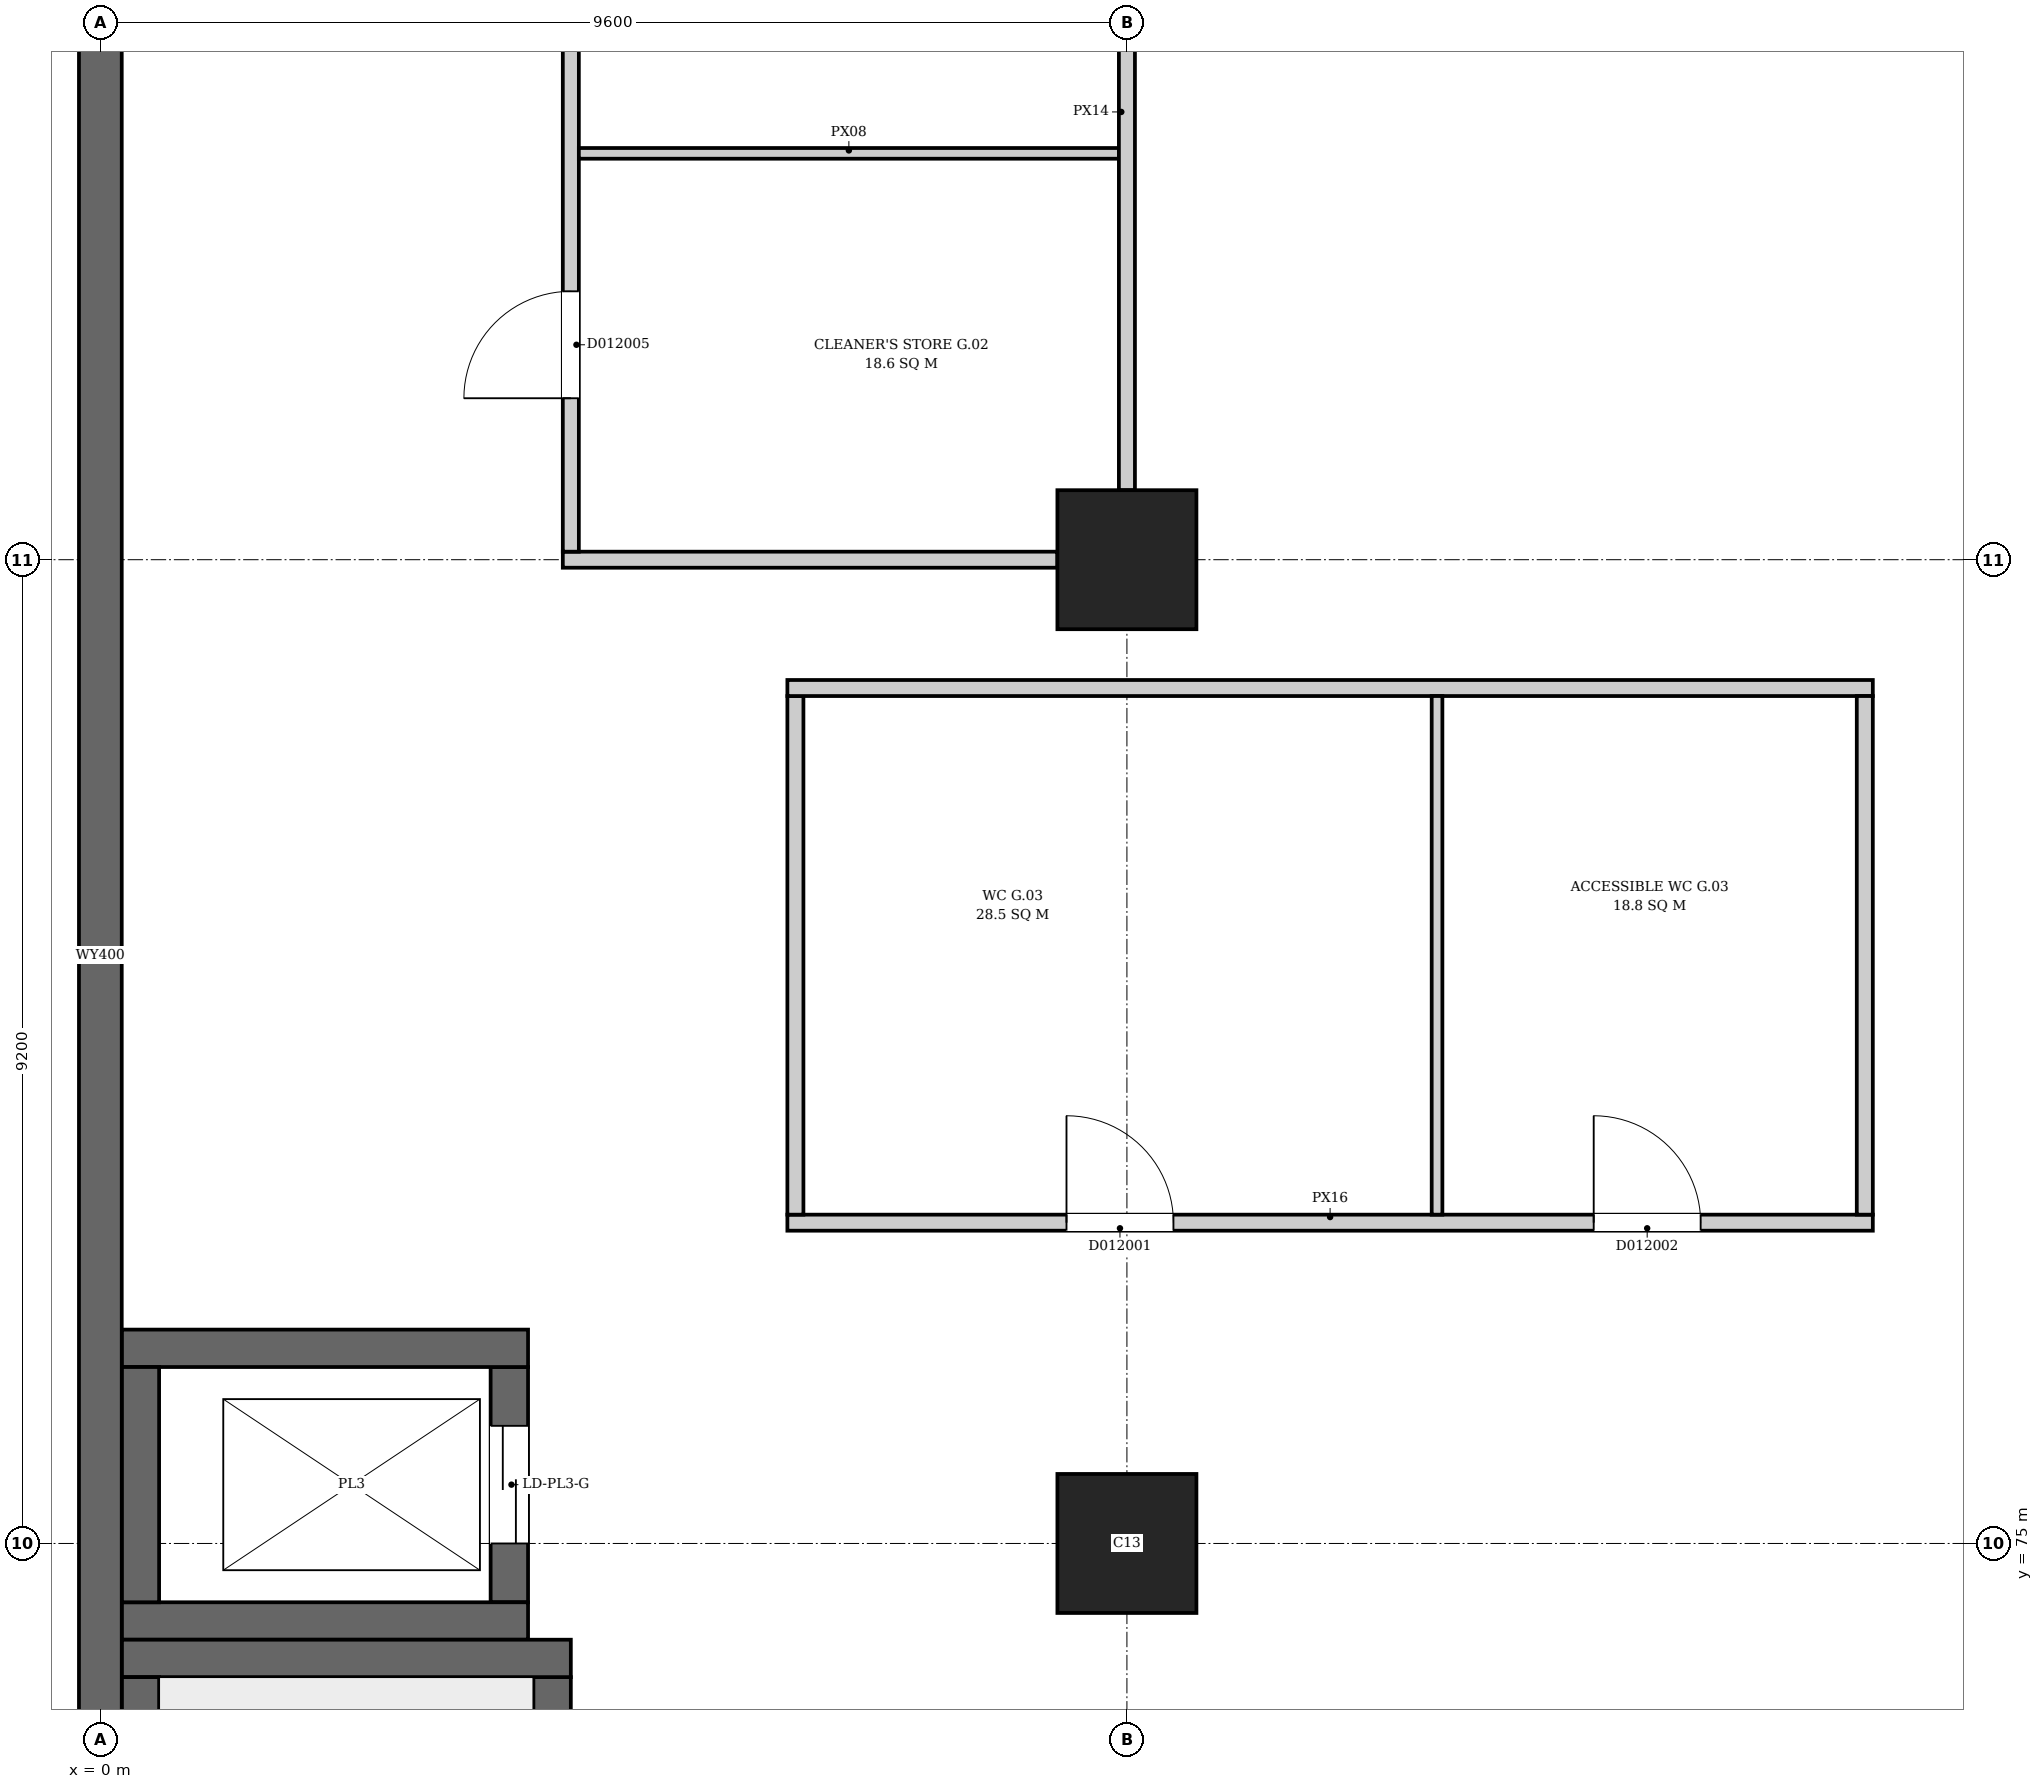
"""IFC4 building model, lengths in metres.
Left out: names, types, materials, properties, quantities, classifications, styles, units other than length and angle.
Written with IfcOpenShell. Run it as: python <this file> out.ifc"""

import sys

from ifc_helpers import new_model, si_unit, direction, frame, frame_2d, origin, origin_2d, place, context, subcontext, project, spatial, rectangle, extrude, element, fill, save


model = new_model("IFC4")
c1 = context("Model", 3, precision=1e-05, world=origin(), true_north=direction((0.0, 1.0)))
c2 = subcontext(c1, "Body", "Model", "MODEL_VIEW")
j1 = project(units=[si_unit("LENGTHUNIT", "METRE"), si_unit("PLANEANGLEUNIT", "RADIAN")], contexts=[c1])
p1 = place(None, origin())
s1 = spatial("IfcSite", under=j1, at=p1, CompositionType="ELEMENT")
p2 = place(p1, origin())
s2 = spatial("IfcBuilding", under=s1, at=p2, CompositionType="ELEMENT")
p3 = place(p2, origin())
s3 = spatial("IfcBuildingStorey", under=s2, at=p3, CompositionType="ELEMENT", Elevation=0.0)
p4 = place(p3, frame((0.0, 46.72, 0.0), z_axis=(0.0, 0.0, 1.0), x_axis=(0.0, 1.0, 0.0)))
e1 = element("IfcWall", 1, at=p4, inside=s3, PredefinedType="SHEAR", context=c2, shape_type="SweptSolid", body=[
    extrude(rectangle(XDim=47.36, YDim=0.4, at=frame_2d((23.68, 0.0))), origin(), (0.0, 0.0, 1.0), 6.5),
])
p5 = place(p4, frame((16.63, 0.0, 0.0)))
e2 = element("IfcOpeningElement", 2, at=p5, cuts=e1, PredefinedType="OPENING", context=c2, shape_type="SweptSolid", body=[
    extrude(rectangle(XDim=3.0, YDim=2.4, at=frame_2d((1.5, 1.2))), frame((0.0, 0.21, 0.0), z_axis=(0.0, -1.0, 0.0), x_axis=(1.0, 0.0, 0.0)), (0.0, 0.0, 1.0), 0.42),
])
p6 = place(p3, frame((0.2, 73.925, 0.0), z_axis=(0.0, 0.0, 1.0), x_axis=(1.0, 0.0, 0.0)))
e3 = element("IfcWall", 3, at=p6, inside=s3, PredefinedType="SHEAR", context=c2, shape_type="SweptSolid", body=[
    extrude(rectangle(XDim=4.2, YDim=0.35, at=frame_2d((2.1, 0.0))), origin(), (0.0, 0.0, 1.0), 6.5),
])
for number, where, z_axis, x_axis in (
    (4, (0.375, 67.05, 0.0), (0.0, 0.0, 1.0), (0.0, 1.0, 0.0)),
    (5, (4.225, 67.05, 0.0), (0.0, 0.0, 1.0), (0.0, 1.0, 0.0)),
):
    element("IfcWall", number, at=place(p3, frame(where, z_axis=z_axis, x_axis=x_axis)), inside=s3, PredefinedType="SHEAR", context=c2, shape_type="SweptSolid", body=[
        extrude(rectangle(XDim=6.7, YDim=0.35, at=frame_2d((3.35, 0.0))), origin(), (0.0, 0.0, 1.0), 6.5),
    ])
for number, where, z_axis, x_axis in (
    (6, (0.2, 74.275, 0.0), (0.0, 0.0, 1.0), (1.0, 0.0, 0.0)),
    (7, (0.2, 76.825, 0.0), (0.0, 0.0, 1.0), (1.0, 0.0, 0.0)),
):
    element("IfcWall", number, at=place(p3, frame(where, z_axis=z_axis, x_axis=x_axis)), inside=s3, PredefinedType="SHEAR", context=c2, shape_type="SweptSolid", body=[
        extrude(rectangle(XDim=3.8, YDim=0.35, at=frame_2d((1.9, 0.0))), origin(), (0.0, 0.0, 1.0), 6.5),
    ])
p7 = place(p3, frame((0.375, 74.45, 0.0), z_axis=(0.0, 0.0, 1.0), x_axis=(0.0, 1.0, 0.0)))
e8 = element("IfcWall", 8, at=p7, inside=s3, PredefinedType="SHEAR", context=c2, shape_type="SweptSolid", body=[
    extrude(rectangle(XDim=2.2, YDim=0.35, at=frame_2d((1.1, 0.0))), origin(), (0.0, 0.0, 1.0), 6.5),
])
p8 = place(p3, frame((3.825, 74.45, 0.0), z_axis=(0.0, 0.0, 1.0), x_axis=(0.0, 1.0, 0.0)))
e9 = element("IfcWall", 9, at=p8, inside=s3, PredefinedType="SHEAR", context=c2, shape_type="SweptSolid", body=[
    extrude(rectangle(XDim=2.2, YDim=0.35, at=frame_2d((1.1, 0.0))), origin(), (0.0, 0.0, 1.0), 6.5),
])
p9 = place(p8, frame((0.55, 0.0, 0.0)))
e10 = element("IfcOpeningElement", 10, at=p9, cuts=e9, PredefinedType="OPENING", context=c2, shape_type="SweptSolid", body=[
    extrude(rectangle(XDim=1.1, YDim=2.1, at=frame_2d((0.55, 1.05))), frame((0.0, 0.185, 0.0), z_axis=(0.0, -1.0, 0.0), x_axis=(1.0, 0.0, 0.0)), (0.0, 0.0, 1.0), 0.37),
])
for number, where, z_axis, x_axis in (
    (11, (9.6, 75.0, 0.0), (0.0, 0.0, 1.0), (1.0, 0.0, 0.0)),
    (12, (9.6, 84.2, 0.0), (0.0, 0.0, 1.0), (1.0, 0.0, 0.0)),
):
    element("IfcColumn", number, at=place(p3, frame(where, z_axis=z_axis, x_axis=x_axis)), inside=s3, PredefinedType="COLUMN", context=c2, shape_type="SweptSolid", body=[
        extrude(rectangle(XDim=1.3, YDim=1.3, at=origin_2d()), origin(), (0.0, 0.0, 1.0), 6.5),
    ])
p10 = place(p3, frame((4.325, 84.2, 0.0), z_axis=(0.0, 0.0, 1.0), x_axis=(1.0, 0.0, 0.0)))
e13 = element("IfcWall", 13, at=p10, inside=s3, PredefinedType="PARTITIONING", context=c2, shape_type="SweptSolid", body=[
    extrude(rectangle(XDim=4.625, YDim=0.15, at=frame_2d((2.312, 0.0))), origin(), (0.0, 0.0, 1.0), 5.65),
])
p11 = place(p3, frame((4.4, 84.275, 0.0), z_axis=(0.0, 0.0, 1.0), x_axis=(0.0, 1.0, 0.0)))
e14 = element("IfcWall", 14, at=p11, inside=s3, PredefinedType="PARTITIONING", context=c2, shape_type="SweptSolid", body=[
    extrude(rectangle(XDim=7.65, YDim=0.15, at=frame_2d((3.825, 0.0))), origin(), (0.0, 0.0, 1.0), 6.05),
])
p12 = place(p11, frame((1.435, 0.0, 0.0)))
e15 = element("IfcOpeningElement", 15, at=p12, cuts=e14, PredefinedType="OPENING", context=c2, shape_type="SweptSolid", body=[
    extrude(rectangle(XDim=1.0, YDim=2.1, at=frame_2d((0.5, 1.05))), frame((0.0, 0.085, 0.0), z_axis=(0.0, -1.0, 0.0), x_axis=(1.0, 0.0, 0.0)), (0.0, 0.0, 1.0), 0.17),
])
p13 = place(p11, frame((5.115, 0.0, 0.0)))
e16 = element("IfcOpeningElement", 16, at=p13, cuts=e14, PredefinedType="OPENING", context=c2, shape_type="SweptSolid", body=[
    extrude(rectangle(XDim=1.0, YDim=2.1, at=frame_2d((0.5, 1.05))), frame((0.0, 0.085, 0.0), z_axis=(0.0, -1.0, 0.0), x_axis=(1.0, 0.0, 0.0)), (0.0, 0.0, 1.0), 0.17),
])
p14 = place(p3, frame((4.475, 88.0, 0.0), z_axis=(0.0, 0.0, 1.0), x_axis=(1.0, 0.0, 0.0)))
e17 = element("IfcWall", 17, at=p14, inside=s3, PredefinedType="PARTITIONING", context=c2, shape_type="SweptSolid", body=[
    extrude(rectangle(XDim=5.05, YDim=0.1, at=frame_2d((2.525, 0.0))), origin(), (0.0, 0.0, 1.0), 6.05),
])
p15 = place(p3, frame((6.425, 78.0, 0.0), z_axis=(0.0, 0.0, 1.0), x_axis=(1.0, 0.0, 0.0)))
e18 = element("IfcWall", 18, at=p15, inside=s3, PredefinedType="PARTITIONING", context=c2, shape_type="SweptSolid", body=[
    extrude(rectangle(XDim=10.15, YDim=0.15, at=frame_2d((5.075, 0.0))), origin(), (0.0, 0.0, 1.0), 6.05),
])
p16 = place(p15, frame((2.61, 0.0, 0.0)))
e19 = element("IfcOpeningElement", 19, at=p16, cuts=e18, PredefinedType="OPENING", context=c2, shape_type="SweptSolid", body=[
    extrude(rectangle(XDim=1.0, YDim=2.1, at=frame_2d((0.5, 1.05))), frame((0.0, 0.085, 0.0), z_axis=(0.0, -1.0, 0.0), x_axis=(1.0, 0.0, 0.0)), (0.0, 0.0, 1.0), 0.17),
])
p17 = place(p15, frame((7.54, 0.0, 0.0)))
e20 = element("IfcOpeningElement", 20, at=p17, cuts=e18, PredefinedType="OPENING", context=c2, shape_type="SweptSolid", body=[
    extrude(rectangle(XDim=1.0, YDim=2.1, at=frame_2d((0.5, 1.05))), frame((0.0, 0.085, 0.0), z_axis=(0.0, -1.0, 0.0), x_axis=(1.0, 0.0, 0.0)), (0.0, 0.0, 1.0), 0.17),
])
p18 = place(p3, frame((6.5, 78.075, 0.0), z_axis=(0.0, 0.0, 1.0), x_axis=(0.0, 1.0, 0.0)))
e21 = element("IfcWall", 21, at=p18, inside=s3, PredefinedType="PARTITIONING", context=c2, shape_type="SweptSolid", body=[
    extrude(rectangle(XDim=4.85, YDim=0.15, at=frame_2d((2.425, 0.0))), origin(), (0.0, 0.0, 1.0), 6.05),
])
p19 = place(p3, frame((6.425, 83.0, 0.0), z_axis=(0.0, 0.0, 1.0), x_axis=(1.0, 0.0, 0.0)))
e22 = element("IfcWall", 22, at=p19, inside=s3, PredefinedType="PARTITIONING", context=c2, shape_type="SweptSolid", body=[
    extrude(rectangle(XDim=10.15, YDim=0.15, at=frame_2d((5.075, 0.0))), origin(), (0.0, 0.0, 1.0), 6.05),
])
p20 = place(p3, frame((9.6, 84.85, 0.0), z_axis=(0.0, 0.0, 1.0), x_axis=(0.0, 1.0, 0.0)))
e23 = element("IfcWall", 23, at=p20, inside=s3, PredefinedType="PARTITIONING", context=c2, shape_type="SweptSolid", body=[
    extrude(rectangle(XDim=7.075, YDim=0.15, at=frame_2d((3.538, 0.0))), origin(), (0.0, 0.0, 1.0), 5.65),
])
p21 = place(p3, frame((12.5, 78.075, 0.0), z_axis=(0.0, 0.0, 1.0), x_axis=(0.0, 1.0, 0.0)))
e24 = element("IfcWall", 24, at=p21, inside=s3, PredefinedType="PARTITIONING", context=c2, shape_type="SweptSolid", body=[
    extrude(rectangle(XDim=4.85, YDim=0.1, at=frame_2d((2.425, 0.0))), origin(), (0.0, 0.0, 1.0), 6.05),
])
p22 = place(p3, frame((16.5, 78.075, 0.0), z_axis=(0.0, 0.0, 1.0), x_axis=(0.0, 1.0, 0.0)))
e25 = element("IfcWall", 25, at=p22, inside=s3, PredefinedType="PARTITIONING", context=c2, shape_type="SweptSolid", body=[
    extrude(rectangle(XDim=4.85, YDim=0.15, at=frame_2d((2.425, 0.0))), origin(), (0.0, 0.0, 1.0), 6.05),
])
p23 = place(p9, origin())
e26 = element("IfcDoor", 26, at=p23, inside=s3, OperationType="DOUBLE_DOOR_SLIDING", PredefinedType="DOOR", context=c2, shape_type="SweptSolid", body=[
    extrude(rectangle(XDim=1.1, YDim=2.1, at=frame_2d((0.55, 1.05))), frame((0.0, 0.025, 0.0), z_axis=(0.0, -1.0, 0.0), x_axis=(1.0, 0.0, 0.0)), (0.0, 0.0, 1.0), 0.05),
])
fill(e10, e26)
p24 = place(p16, origin())
e27 = element("IfcDoor", 27, at=p24, inside=s3, OperationType="SINGLE_SWING_LEFT", PredefinedType="DOOR", context=c2, shape_type="SweptSolid", body=[
    extrude(rectangle(XDim=1.0, YDim=2.1, at=frame_2d((0.5, 1.05))), frame((0.0, 0.025, 0.0), z_axis=(0.0, -1.0, 0.0), x_axis=(1.0, 0.0, 0.0)), (0.0, 0.0, 1.0), 0.05),
])
fill(e19, e27)
p25 = place(p17, origin())
e28 = element("IfcDoor", 28, at=p25, inside=s3, OperationType="SINGLE_SWING_RIGHT", PredefinedType="DOOR", context=c2, shape_type="SweptSolid", body=[
    extrude(rectangle(XDim=1.0, YDim=2.1, at=frame_2d((0.5, 1.05))), frame((0.0, 0.025, 0.0), z_axis=(0.0, -1.0, 0.0), x_axis=(1.0, 0.0, 0.0)), (0.0, 0.0, 1.0), 0.05),
])
fill(e20, e28)
p26 = place(p12, origin())
e29 = element("IfcDoor", 29, at=p26, inside=s3, OperationType="SINGLE_SWING_RIGHT", PredefinedType="DOOR", context=c2, shape_type="SweptSolid", body=[
    extrude(rectangle(XDim=1.0, YDim=2.1, at=frame_2d((0.5, 1.05))), frame((0.0, 0.025, 0.0), z_axis=(0.0, -1.0, 0.0), x_axis=(1.0, 0.0, 0.0)), (0.0, 0.0, 1.0), 0.05),
])
fill(e15, e29)
save(model, sys.argv[1])
